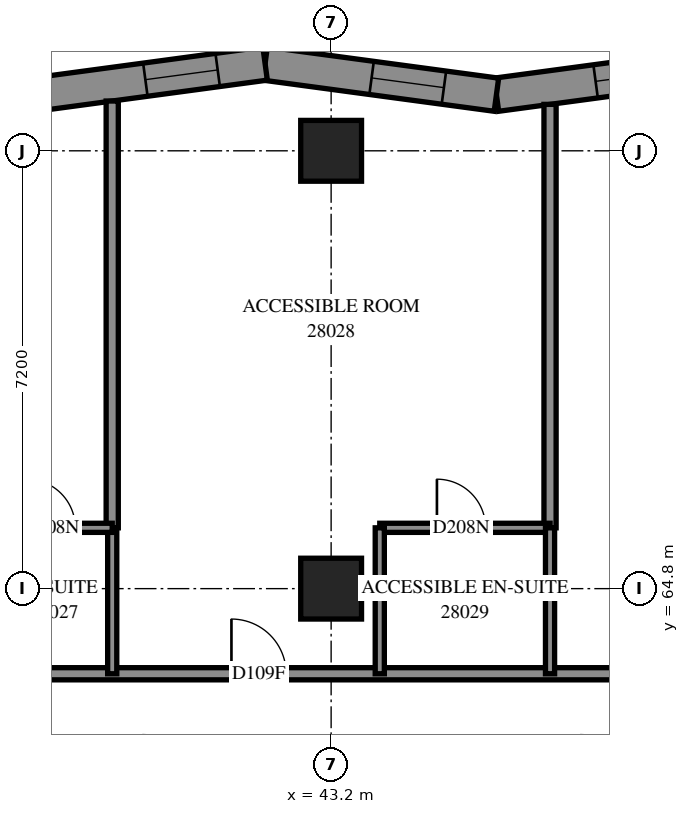
"""IFC4 building model, lengths in metres.
Left out: names, types, materials, properties, quantities, classifications, styles, units other than length and angle.
Written with IfcOpenShell. Run it as: python <this file> out.ifc"""

import sys

from ifc_helpers import new_model, si_unit, direction, frame, frame_2d, origin, origin_2d, place, context, subcontext, project, spatial, polyline, rectangle, outline, extrude, element, fill, save


model = new_model("IFC4")
c1 = context("Model", 3, precision=1e-05, world=origin(), true_north=direction((0.0, 1.0)))
c2 = subcontext(c1, "Body", "Model", "MODEL_VIEW")
j1 = project(units=[si_unit("LENGTHUNIT", "METRE"), si_unit("PLANEANGLEUNIT", "RADIAN")], contexts=[c1])
p1 = place(None, origin())
s1 = spatial("IfcSite", under=j1, at=p1, CompositionType="ELEMENT")
p2 = place(p1, origin())
s2 = spatial("IfcBuilding", under=s1, at=p2, CompositionType="ELEMENT")
p3 = place(p2, frame((0.0, 0.0, 105.0)))
s3 = spatial("IfcBuildingStorey", under=s2, at=p3, CompositionType="ELEMENT", Elevation=105.0)
for number, where, z_axis, x_axis in (
    (1, (43.2, 64.8, 0.0), (0.0, 0.0, 1.0), (1.0, 0.0, 0.0)),
    (2, (43.2, 72.0, 0.0), (0.0, 0.0, 1.0), (1.0, 0.0, 0.0)),
):
    element("IfcColumn", number, at=place(p3, frame(where, z_axis=z_axis, x_axis=x_axis)), inside=s3, PredefinedType="COLUMN", context=c2, shape_type="SweptSolid", body=[
        extrude(rectangle(XDim=1.0, YDim=1.0, at=origin_2d()), origin(), (0.0, 0.0, 1.0), 3.1),
    ])
p4 = place(p3, frame((49.723, 73.434, 0.0), z_axis=(0.0, 0.0, 1.0), x_axis=(-0.9910651652, -0.1333785524, 0.0)))
e3 = element("IfcWall", 3, at=p4, inside=s3, PredefinedType="SOLIDWALL", context=c2, shape_type="SweptSolid", body=[
    extrude(outline(polyline([(-0.037, -0.275), (3.802, -0.275), (3.876, 0.275), (0.037, 0.275), (-0.037, -0.275)])), origin(), (0.0, 0.0, 1.0), 3.1),
])
p5 = place(p4, frame((0.993, 0.0, 0.5)))
e4 = element("IfcOpeningElement", 4, at=p5, cuts=e3, PredefinedType="OPENING", context=c2, shape_type="SweptSolid", body=[
    extrude(rectangle(XDim=1.2, YDim=2.45, at=frame_2d((0.6, 1.225))), frame((0.0, 0.285, 0.0), z_axis=(0.0, -1.0, 0.0), x_axis=(1.0, 0.0, 0.0)), (0.0, 0.0, 1.0), 0.57),
])
p6 = place(p3, frame((45.919, 72.922, 0.0), z_axis=(0.0, 0.0, 1.0), x_axis=(-0.9910651652, 0.1333785524, 0.0)))
e5 = element("IfcWall", 5, at=p6, inside=s3, PredefinedType="SOLIDWALL", context=c2, shape_type="SweptSolid", body=[
    extrude(outline(polyline([(0.037, -0.275), (3.876, -0.275), (3.802, 0.275), (-0.037, 0.275), (0.037, -0.275)])), origin(), (0.0, 0.0, 1.0), 3.1),
])
p7 = place(p6, frame((0.872, 0.0, 0.5)))
e6 = element("IfcOpeningElement", 6, at=p7, cuts=e5, PredefinedType="OPENING", context=c2, shape_type="SweptSolid", body=[
    extrude(rectangle(XDim=1.2, YDim=2.45, at=frame_2d((0.6, 1.225))), frame((0.0, 0.285, 0.0), z_axis=(0.0, -1.0, 0.0), x_axis=(1.0, 0.0, 0.0)), (0.0, 0.0, 1.0), 0.57),
])
p8 = place(p3, frame((42.114, 73.434, 0.0), z_axis=(0.0, 0.0, 1.0), x_axis=(-0.9910647018, -0.133381996, 0.0)))
e7 = element("IfcWall", 7, at=p8, inside=s3, PredefinedType="SOLIDWALL", context=c2, shape_type="SweptSolid", body=[
    extrude(outline(polyline([(-0.037, -0.275), (3.802, -0.275), (3.876, 0.275), (0.037, 0.275), (-0.037, -0.275)])), origin(), (0.0, 0.0, 1.0), 3.1),
])
p9 = place(p8, frame((0.787, 0.0, 0.5)))
e8 = element("IfcOpeningElement", 8, at=p9, cuts=e7, PredefinedType="OPENING", context=c2, shape_type="SweptSolid", body=[
    extrude(rectangle(XDim=1.2, YDim=2.45, at=frame_2d((0.6, 1.225))), frame((0.0, 0.285, 0.0), z_axis=(0.0, -1.0, 0.0), x_axis=(1.0, 0.0, 0.0)), (0.0, 0.0, 1.0), 0.57),
])
p10 = place(p3, frame((33.4, 63.4, 0.0), z_axis=(0.0, 0.0, 1.0), x_axis=(1.0, 0.0, 0.0)))
e9 = element("IfcWall", 9, at=p10, inside=s3, PredefinedType="PARTITIONING", context=c2, shape_type="SweptSolid", body=[
    extrude(rectangle(XDim=21.9, YDim=0.2, at=frame_2d((10.95, 0.0))), origin(), (0.0, 0.0, 1.0), 3.1),
])
p11 = place(p10, frame((3.152, 0.0, 0.0)))
e10 = element("IfcOpeningElement", 10, at=p11, cuts=e9, PredefinedType="OPENING", context=c2, shape_type="SweptSolid", body=[
    extrude(rectangle(XDim=0.9, YDim=2.1, at=frame_2d((0.45, 1.05))), frame((0.0, 0.11, 0.0), z_axis=(0.0, -1.0, 0.0), x_axis=(1.0, 0.0, 0.0)), (0.0, 0.0, 1.0), 0.22),
])
p12 = place(p10, frame((8.161, 0.0, 0.0)))
e11 = element("IfcOpeningElement", 11, at=p12, cuts=e9, PredefinedType="OPENING", context=c2, shape_type="SweptSolid", body=[
    extrude(rectangle(XDim=0.9, YDim=2.1, at=frame_2d((0.45, 1.05))), frame((0.0, 0.11, 0.0), z_axis=(0.0, -1.0, 0.0), x_axis=(1.0, 0.0, 0.0)), (0.0, 0.0, 1.0), 0.22),
])
p13 = place(p10, frame((15.471, 0.0, 0.0)))
e12 = element("IfcOpeningElement", 12, at=p13, cuts=e9, PredefinedType="OPENING", context=c2, shape_type="SweptSolid", body=[
    extrude(rectangle(XDim=1.0, YDim=2.1, at=frame_2d((0.5, 1.05))), frame((0.0, 0.11, 0.0), z_axis=(0.0, -1.0, 0.0), x_axis=(1.0, 0.0, 0.0)), (0.0, 0.0, 1.0), 0.22),
])
p14 = place(p3, frame((39.6, 65.8, 0.0), z_axis=(0.0, 0.0, 1.0), x_axis=(0.0, 1.0, 0.0)))
e13 = element("IfcWall", 13, at=p14, inside=s3, PredefinedType="PARTITIONING", context=c2, shape_type="SweptSolid", body=[
    extrude(rectangle(XDim=7.019, YDim=0.2, at=frame_2d((3.509, 0.0))), origin(), (0.0, 0.0, 1.0), 3.1),
])
p15 = place(p3, frame((46.8, 65.8, 0.0), z_axis=(0.0, 0.0, 1.0), x_axis=(0.0, 1.0, 0.0)))
e14 = element("IfcWall", 14, at=p15, inside=s3, PredefinedType="PARTITIONING", context=c2, shape_type="SweptSolid", body=[
    extrude(rectangle(XDim=6.964, YDim=0.2, at=frame_2d((3.482, 0.0))), origin(), (0.0, 0.0, 1.0), 3.1),
])
p16 = place(p3, frame((44.0, 65.8, 0.0), z_axis=(0.0, 0.0, 1.0), x_axis=(1.0, 0.0, 0.0)))
e15 = element("IfcWall", 15, at=p16, inside=s3, PredefinedType="PARTITIONING", context=c2, shape_type="SweptSolid", body=[
    extrude(rectangle(XDim=2.8, YDim=0.15, at=frame_2d((1.4, 0.0))), origin(), (0.0, 0.0, 1.0), 3.1),
])
p17 = place(p16, frame((0.94, 0.0, 0.0)))
e16 = element("IfcOpeningElement", 16, at=p17, cuts=e15, PredefinedType="OPENING", context=c2, shape_type="SweptSolid", body=[
    extrude(rectangle(XDim=0.8, YDim=2.1, at=frame_2d((0.4, 1.05))), frame((0.0, 0.085, 0.0), z_axis=(0.0, -1.0, 0.0), x_axis=(1.0, 0.0, 0.0)), (0.0, 0.0, 1.0), 0.17),
])
for number, where, z_axis, x_axis in (
    (17, (39.6, 63.4, 0.0), (0.0, 0.0, 1.0), (0.0, 1.0, 0.0)),
    (18, (44.0, 63.4, 0.0), (0.0, 0.0, 1.0), (0.0, 1.0, 0.0)),
    (19, (46.8, 63.4, 0.0), (0.0, 0.0, 1.0), (0.0, 1.0, 0.0)),
):
    element("IfcWall", number, at=place(p3, frame(where, z_axis=z_axis, x_axis=x_axis)), inside=s3, PredefinedType="PARTITIONING", context=c2, shape_type="SweptSolid", body=[
        extrude(rectangle(XDim=2.4, YDim=0.15, at=frame_2d((1.2, 0.0))), origin(), (0.0, 0.0, 1.0), 3.1),
    ])
p18 = place(p3, frame((37.7, 65.8, 0.0), z_axis=(0.0, 0.0, 1.0), x_axis=(1.0, 0.0, 0.0)))
e20 = element("IfcWall", 20, at=p18, inside=s3, PredefinedType="PARTITIONING", context=c2, shape_type="SweptSolid", body=[
    extrude(rectangle(XDim=1.9, YDim=0.15, at=frame_2d((0.95, 0.0))), origin(), (0.0, 0.0, 1.0), 3.1),
])
p19 = place(p18, frame((0.493, 0.0, 0.0)))
e21 = element("IfcOpeningElement", 21, at=p19, cuts=e20, PredefinedType="OPENING", context=c2, shape_type="SweptSolid", body=[
    extrude(rectangle(XDim=0.8, YDim=2.1, at=frame_2d((0.4, 1.05))), frame((0.0, 0.085, 0.0), z_axis=(0.0, -1.0, 0.0), x_axis=(1.0, 0.0, 0.0)), (0.0, 0.0, 1.0), 0.17),
])
p20 = place(p5, origin())
e22 = element("IfcWindow", 22, at=p20, inside=s3, PartitioningType="SINGLE_PANEL", PredefinedType="WINDOW", context=c2, shape_type="SweptSolid", body=[
    extrude(rectangle(XDim=1.2, YDim=2.45, at=frame_2d((0.6, 1.225))), frame((0.0, 0.155, 0.0), z_axis=(0.0, -1.0, 0.0), x_axis=(1.0, 0.0, 0.0)), (0.0, 0.0, 1.0), 0.06),
])
fill(e4, e22)
p21 = place(p7, origin())
e23 = element("IfcWindow", 23, at=p21, inside=s3, PartitioningType="SINGLE_PANEL", PredefinedType="WINDOW", context=c2, shape_type="SweptSolid", body=[
    extrude(rectangle(XDim=1.2, YDim=2.45, at=frame_2d((0.6, 1.225))), frame((0.0, 0.155, 0.0), z_axis=(0.0, -1.0, 0.0), x_axis=(1.0, 0.0, 0.0)), (0.0, 0.0, 1.0), 0.06),
])
fill(e6, e23)
p22 = place(p9, origin())
e24 = element("IfcWindow", 24, at=p22, inside=s3, PartitioningType="SINGLE_PANEL", PredefinedType="WINDOW", context=c2, shape_type="SweptSolid", body=[
    extrude(rectangle(XDim=1.2, YDim=2.45, at=frame_2d((0.6, 1.225))), frame((0.0, 0.155, 0.0), z_axis=(0.0, -1.0, 0.0), x_axis=(1.0, 0.0, 0.0)), (0.0, 0.0, 1.0), 0.06),
])
fill(e8, e24)
p23 = place(p19, origin())
e25 = element("IfcDoor", 25, at=p23, inside=s3, OperationType="SINGLE_SWING_RIGHT", PredefinedType="DOOR", context=c2, shape_type="SweptSolid", body=[
    extrude(rectangle(XDim=0.8, YDim=2.1, at=frame_2d((0.4, 1.05))), frame((0.0, 0.025, 0.0), z_axis=(0.0, -1.0, 0.0), x_axis=(1.0, 0.0, 0.0)), (0.0, 0.0, 1.0), 0.05),
])
fill(e21, e25)
p24 = place(p12, origin())
e26 = element("IfcDoor", 26, at=p24, inside=s3, OperationType="SINGLE_SWING_LEFT", PredefinedType="DOOR", context=c2, shape_type="SweptSolid", body=[
    extrude(rectangle(XDim=0.9, YDim=2.1, at=frame_2d((0.45, 1.05))), frame((0.0, 0.025, 0.0), z_axis=(0.0, -1.0, 0.0), x_axis=(1.0, 0.0, 0.0)), (0.0, 0.0, 1.0), 0.05),
])
fill(e11, e26)
p25 = place(p17, origin())
e27 = element("IfcDoor", 27, at=p25, inside=s3, OperationType="SINGLE_SWING_RIGHT", PredefinedType="DOOR", context=c2, shape_type="SweptSolid", body=[
    extrude(rectangle(XDim=0.8, YDim=2.1, at=frame_2d((0.4, 1.05))), frame((0.0, 0.025, 0.0), z_axis=(0.0, -1.0, 0.0), x_axis=(1.0, 0.0, 0.0)), (0.0, 0.0, 1.0), 0.05),
])
fill(e16, e27)
save(model, sys.argv[1])
